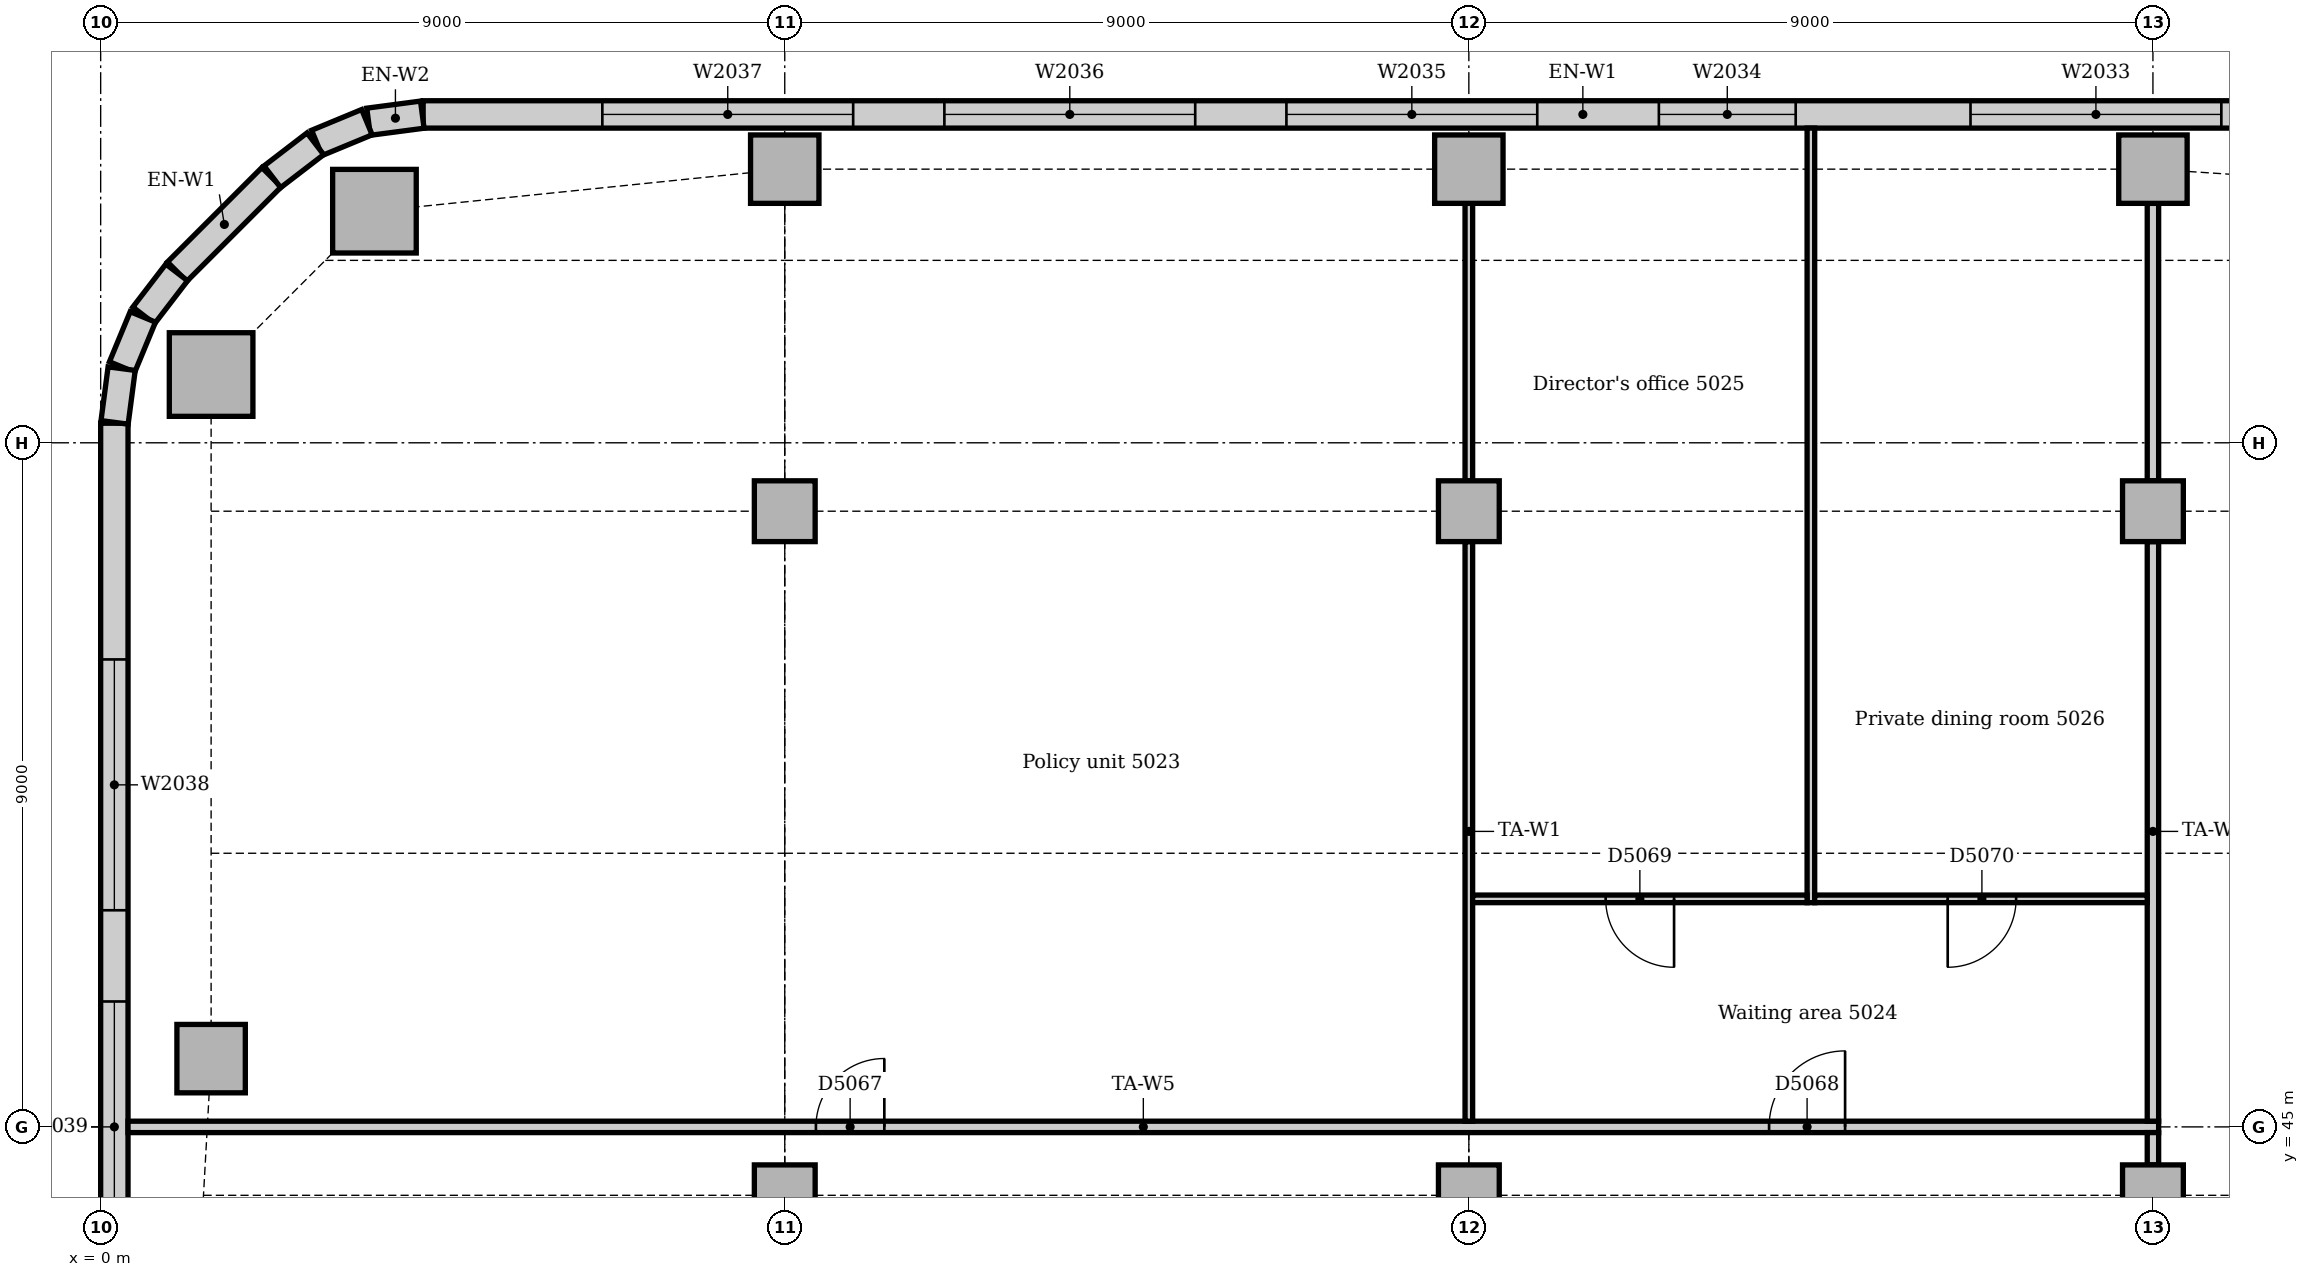
"""IFC4 building model, lengths in metres.
Left out: names, types, materials, properties, quantities, classifications, styles, units other than length and angle.
Written with IfcOpenShell. Run it as: python <this file> out.ifc"""

import sys

from ifc_helpers import new_model, si_unit, direction, frame, frame_2d, origin, origin_2d, place, context, subcontext, project, spatial, rectangle, extrude, element, fill, save


model = new_model("IFC4")
c1 = context("Model", 3, precision=1e-05, world=origin(), true_north=direction((0.0, 1.0)))
c2 = subcontext(c1, "Body", "Model", "MODEL_VIEW")
j1 = project(units=[si_unit("LENGTHUNIT", "METRE"), si_unit("PLANEANGLEUNIT", "RADIAN")], contexts=[c1])
p1 = place(None, origin())
s1 = spatial("IfcSite", under=j1, at=p1, CompositionType="ELEMENT")
p2 = place(p1, origin())
s2 = spatial("IfcBuilding", under=s1, at=p2, CompositionType="ELEMENT")
p3 = place(p2, frame((0.0, 0.0, 210.0)))
s3 = spatial("IfcBuildingStorey", under=s2, at=p3, CompositionType="ELEMENT", Elevation=210.0)
for number, where, z_axis, x_axis in (
    (1, (3.602, 57.047, 0.0), (0.0, 0.0, 1.0), (1.0, 0.0, 0.0)),
    (2, (1.453, 54.898, 0.0), (0.0, 0.0, 1.0), (1.0, 0.0, 0.0)),
):
    element("IfcColumn", number, at=place(p3, frame(where, z_axis=z_axis, x_axis=x_axis)), inside=s3, PredefinedType="COLUMN", context=c2, shape_type="SweptSolid", body=[
        extrude(rectangle(XDim=1.1, YDim=1.1, at=origin_2d()), origin(), (0.0, 0.0, 1.0), 3.85),
    ])
for number, where, z_axis, x_axis in (
    (3, (9.0, 57.6, 0.0), (0.0, 0.0, 1.0), (1.0, 0.0, 0.0)),
    (4, (18.0, 57.6, 0.0), (0.0, 0.0, 1.0), (1.0, 0.0, 0.0)),
    (5, (27.0, 57.6, 0.0), (0.0, 0.0, 1.0), (1.0, 0.0, 0.0)),
    (6, (1.453, 45.898, 0.0), (0.0, 0.0, 1.0), (1.0, 0.0, 0.0)),
):
    element("IfcColumn", number, at=place(p3, frame(where, z_axis=z_axis, x_axis=x_axis)), inside=s3, PredefinedType="COLUMN", context=c2, shape_type="SweptSolid", body=[
        extrude(rectangle(XDim=0.9, YDim=0.9, at=origin_2d()), origin(), (0.0, 0.0, 1.0), 3.85),
    ])
for number, where, z_axis, x_axis in (
    (7, (9.0, 44.1, 0.0), (0.0, 0.0, 1.0), (1.0, 0.0, 0.0)),
    (8, (9.0, 53.1, 0.0), (0.0, 0.0, 1.0), (1.0, 0.0, 0.0)),
    (9, (18.0, 44.1, 0.0), (0.0, 0.0, 1.0), (1.0, 0.0, 0.0)),
    (10, (18.0, 53.1, 0.0), (0.0, 0.0, 1.0), (1.0, 0.0, 0.0)),
    (11, (27.0, 44.1, 0.0), (0.0, 0.0, 1.0), (1.0, 0.0, 0.0)),
    (12, (27.0, 53.1, 0.0), (0.0, 0.0, 1.0), (1.0, 0.0, 0.0)),
):
    element("IfcColumn", number, at=place(p3, frame(where, z_axis=z_axis, x_axis=x_axis)), inside=s3, PredefinedType="COLUMN", context=c2, shape_type="SweptSolid", body=[
        extrude(rectangle(XDim=0.8, YDim=0.8, at=origin_2d()), origin(), (0.0, 0.0, 1.0), 3.85),
    ])
p4 = place(p3, frame((34.757, 58.32, 0.0), z_axis=(0.0, 0.0, 1.0), x_axis=(-1.0, 0.0, 0.0)))
e13 = element("IfcWall", 13, at=p4, inside=s3, PredefinedType="STANDARD", context=c2, shape_type="SweptSolid", body=[
    extrude(rectangle(XDim=30.515, YDim=0.36, at=frame_2d((15.257, 0.0))), origin(), (0.0, 0.0, 1.0), 3.85),
])
p5 = place(p4, frame((2.357, 0.0, 0.9)))
e14 = element("IfcOpeningElement", 14, at=p5, cuts=e13, PredefinedType="OPENING", context=c2, shape_type="SweptSolid", body=[
    extrude(rectangle(XDim=3.3, YDim=1.6, at=frame_2d((1.65, 0.8))), frame((0.0, 0.19, 0.0), z_axis=(0.0, -1.0, 0.0), x_axis=(1.0, 0.0, 0.0)), (0.0, 0.0, 1.0), 0.38),
])
p6 = place(p4, frame((6.857, 0.0, 0.9)))
e15 = element("IfcOpeningElement", 15, at=p6, cuts=e13, PredefinedType="OPENING", context=c2, shape_type="SweptSolid", body=[
    extrude(rectangle(XDim=3.3, YDim=1.6, at=frame_2d((1.65, 0.8))), frame((0.0, 0.19, 0.0), z_axis=(0.0, -1.0, 0.0), x_axis=(1.0, 0.0, 0.0)), (0.0, 0.0, 1.0), 0.38),
])
p7 = place(p4, frame((12.457, 0.0, 0.9)))
e16 = element("IfcOpeningElement", 16, at=p7, cuts=e13, PredefinedType="OPENING", context=c2, shape_type="SweptSolid", body=[
    extrude(rectangle(XDim=1.8, YDim=1.6, at=frame_2d((0.9, 0.8))), frame((0.0, 0.19, 0.0), z_axis=(0.0, -1.0, 0.0), x_axis=(1.0, 0.0, 0.0)), (0.0, 0.0, 1.0), 0.38),
])
p8 = place(p4, frame((15.857, 0.0, 0.9)))
e17 = element("IfcOpeningElement", 17, at=p8, cuts=e13, PredefinedType="OPENING", context=c2, shape_type="SweptSolid", body=[
    extrude(rectangle(XDim=3.3, YDim=1.6, at=frame_2d((1.65, 0.8))), frame((0.0, 0.19, 0.0), z_axis=(0.0, -1.0, 0.0), x_axis=(1.0, 0.0, 0.0)), (0.0, 0.0, 1.0), 0.38),
])
p9 = place(p4, frame((20.357, 0.0, 0.9)))
e18 = element("IfcOpeningElement", 18, at=p9, cuts=e13, PredefinedType="OPENING", context=c2, shape_type="SweptSolid", body=[
    extrude(rectangle(XDim=3.3, YDim=1.6, at=frame_2d((1.65, 0.8))), frame((0.0, 0.19, 0.0), z_axis=(0.0, -1.0, 0.0), x_axis=(1.0, 0.0, 0.0)), (0.0, 0.0, 1.0), 0.38),
])
p10 = place(p4, frame((24.857, 0.0, 0.9)))
e19 = element("IfcOpeningElement", 19, at=p10, cuts=e13, PredefinedType="OPENING", context=c2, shape_type="SweptSolid", body=[
    extrude(rectangle(XDim=3.3, YDim=1.6, at=frame_2d((1.65, 0.8))), frame((0.0, 0.19, 0.0), z_axis=(0.0, -1.0, 0.0), x_axis=(1.0, 0.0, 0.0)), (0.0, 0.0, 1.0), 0.38),
])
p11 = place(p3, frame((2.249, 57.494, 0.0), z_axis=(0.0, 0.0, 1.0), x_axis=(-0.707106781187, -0.707106781187, 0.0)))
e20 = element("IfcWall", 20, at=p11, inside=s3, PredefinedType="STANDARD", context=c2, shape_type="SweptSolid", body=[
    extrude(rectangle(XDim=1.757, YDim=0.36, at=frame_2d((0.879, 0.0))), origin(), (0.0, 0.0, 1.0), 3.85),
])
p12 = place(p3, frame((0.18, 54.257, 0.0), z_axis=(0.0, 0.0, 1.0), x_axis=(0.0, -1.0, 0.0)))
e21 = element("IfcWall", 21, at=p12, inside=s3, PredefinedType="STANDARD", context=c2, shape_type="SweptSolid", body=[
    extrude(rectangle(XDim=12.257, YDim=0.36, at=frame_2d((6.129, 0.0))), origin(), (0.0, 0.0, 1.0), 3.85),
])
p13 = place(p12, frame((3.107, 0.0, 0.9)))
e22 = element("IfcOpeningElement", 22, at=p13, cuts=e21, PredefinedType="OPENING", context=c2, shape_type="SweptSolid", body=[
    extrude(rectangle(XDim=3.3, YDim=1.6, at=frame_2d((1.65, 0.8))), frame((0.0, 0.19, 0.0), z_axis=(0.0, -1.0, 0.0), x_axis=(1.0, 0.0, 0.0)), (0.0, 0.0, 1.0), 0.38),
])
p14 = place(p12, frame((7.607, 0.0, 0.9)))
e23 = element("IfcOpeningElement", 23, at=p14, cuts=e21, PredefinedType="OPENING", context=c2, shape_type="SweptSolid", body=[
    extrude(rectangle(XDim=3.3, YDim=1.6, at=frame_2d((1.65, 0.8))), frame((0.0, 0.19, 0.0), z_axis=(0.0, -1.0, 0.0), x_axis=(1.0, 0.0, 0.0)), (0.0, 0.0, 1.0), 0.38),
])
for number, where, z_axis, x_axis in (
    (24, (4.231, 58.317, 0.0), (0.0, 0.0, 1.0), (-0.991, -0.131, 0.0)),
    (25, (3.503, 58.218, 0.0), (0.0, 0.0, 1.0), (-0.924, -0.383, 0.0)),
):
    element("IfcWall", number, at=place(p3, frame(where, z_axis=z_axis, x_axis=x_axis)), inside=s3, PredefinedType="STANDARD", context=c2, shape_type="SweptSolid", body=[
        extrude(rectangle(XDim=0.713, YDim=0.36, at=frame_2d((0.356, 0.0))), origin(), (0.0, 0.0, 1.0), 3.85),
    ])
for number, where, z_axis, x_axis in (
    (26, (2.825, 57.934, 0.0), (0.0, 0.0, 1.0), (-0.793, -0.609, 0.0)),
    (27, (1.0, 56.241, 0.0), (0.0, 0.0, 1.0), (-0.609, -0.793, 0.0)),
):
    element("IfcWall", number, at=place(p3, frame(where, z_axis=z_axis, x_axis=x_axis)), inside=s3, PredefinedType="STANDARD", context=c2, shape_type="SweptSolid", body=[
        extrude(rectangle(XDim=0.713, YDim=0.36, at=frame_2d((0.357, 0.0))), origin(), (0.0, 0.0, 1.0), 3.85),
    ])
for number, where, z_axis, x_axis in (
    (28, (0.555, 55.656, 0.0), (0.0, 0.0, 1.0), (-0.383, -0.924, 0.0)),
    (29, (0.276, 54.976, 0.0), (0.0, 0.0, 1.0), (-0.131, -0.991, 0.0)),
):
    element("IfcWall", number, at=place(p3, frame(where, z_axis=z_axis, x_axis=x_axis)), inside=s3, PredefinedType="STANDARD", context=c2, shape_type="SweptSolid", body=[
        extrude(rectangle(XDim=0.713, YDim=0.36, at=frame_2d((0.356, 0.0))), origin(), (0.0, 0.0, 1.0), 3.85),
    ])
p15 = place(p3, frame((0.36, 45.0, 0.0), z_axis=(0.0, 0.0, 1.0), x_axis=(1.0, 0.0, 0.0)))
e30 = element("IfcWall", 30, at=p15, inside=s3, PredefinedType="PARTITIONING", context=c2, shape_type="SweptSolid", body=[
    extrude(rectangle(XDim=26.715, YDim=0.15, at=frame_2d((13.357, 0.0))), origin(), (0.0, 0.0, 1.0), 3.85),
])
p16 = place(p15, frame((9.05, 0.0, 0.0)))
e31 = element("IfcOpeningElement", 31, at=p16, cuts=e30, PredefinedType="OPENING", context=c2, shape_type="SweptSolid", body=[
    extrude(rectangle(XDim=0.9, YDim=2.1, at=frame_2d((0.45, 1.05))), frame((0.0, 0.085, 0.0), z_axis=(0.0, -1.0, 0.0), x_axis=(1.0, 0.0, 0.0)), (0.0, 0.0, 1.0), 0.17),
])
p17 = place(p15, frame((21.59, 0.0, 0.0)))
e32 = element("IfcOpeningElement", 32, at=p17, cuts=e30, PredefinedType="OPENING", context=c2, shape_type="SweptSolid", body=[
    extrude(rectangle(XDim=1.0, YDim=2.1, at=frame_2d((0.5, 1.05))), frame((0.0, 0.085, 0.0), z_axis=(0.0, -1.0, 0.0), x_axis=(1.0, 0.0, 0.0)), (0.0, 0.0, 1.0), 0.17),
])
p18 = place(p3, frame((27.0, 44.5, 0.0), z_axis=(0.0, 0.0, 1.0), x_axis=(0.0, 1.0, 0.0)))
e33 = element("IfcWall", 33, at=p18, inside=s3, PredefinedType="PARTITIONING", context=c2, shape_type="SweptSolid", body=[
    extrude(rectangle(XDim=0.425, YDim=0.15, at=frame_2d((0.212, 0.0))), origin(), (0.0, 0.0, 1.0), 3.85),
])
p19 = place(p3, frame((27.0, 45.075, 0.0), z_axis=(0.0, 0.0, 1.0), x_axis=(0.0, 1.0, 0.0)))
e34 = element("IfcWall", 34, at=p19, inside=s3, PredefinedType="PARTITIONING", context=c2, shape_type="SweptSolid", body=[
    extrude(rectangle(XDim=7.625, YDim=0.15, at=frame_2d((3.812, 0.0))), origin(), (0.0, 0.0, 1.0), 3.35),
])
p20 = place(p3, frame((27.0, 53.5, 0.0), z_axis=(0.0, 0.0, 1.0), x_axis=(0.0, 1.0, 0.0)))
e35 = element("IfcWall", 35, at=p20, inside=s3, PredefinedType="PARTITIONING", context=c2, shape_type="SweptSolid", body=[
    extrude(rectangle(XDim=3.65, YDim=0.15, at=frame_2d((1.825, 0.0))), origin(), (0.0, 0.0, 1.0), 3.41),
])
p21 = place(p3, frame((18.0, 45.075, 0.0), z_axis=(0.0, 0.0, 1.0), x_axis=(0.0, 1.0, 0.0)))
e36 = element("IfcWall", 36, at=p21, inside=s3, PredefinedType="PARTITIONING", context=c2, shape_type="SweptSolid", body=[
    extrude(rectangle(XDim=7.625, YDim=0.1, at=frame_2d((3.812, 0.0))), origin(), (0.0, 0.0, 1.0), 3.35),
])
p22 = place(p3, frame((18.0, 53.5, 0.0), z_axis=(0.0, 0.0, 1.0), x_axis=(0.0, 1.0, 0.0)))
e37 = element("IfcWall", 37, at=p22, inside=s3, PredefinedType="PARTITIONING", context=c2, shape_type="SweptSolid", body=[
    extrude(rectangle(XDim=3.65, YDim=0.1, at=frame_2d((1.825, 0.0))), origin(), (0.0, 0.0, 1.0), 3.41),
])
p23 = place(p3, frame((22.5, 47.95, 0.0), z_axis=(0.0, 0.0, 1.0), x_axis=(0.0, 1.0, 0.0)))
e38 = element("IfcWall", 38, at=p23, inside=s3, PredefinedType="PARTITIONING", context=c2, shape_type="SweptSolid", body=[
    extrude(rectangle(XDim=10.19, YDim=0.1, at=frame_2d((5.095, 0.0))), origin(), (0.0, 0.0, 1.0), 3.85),
])
p24 = place(p3, frame((18.05, 48.0, 0.0), z_axis=(0.0, 0.0, 1.0), x_axis=(1.0, 0.0, 0.0)))
e39 = element("IfcWall", 39, at=p24, inside=s3, PredefinedType="PARTITIONING", context=c2, shape_type="SweptSolid", body=[
    extrude(rectangle(XDim=4.4, YDim=0.1, at=frame_2d((2.2, 0.0))), origin(), (0.0, 0.0, 1.0), 3.85),
])
p25 = place(p24, frame((1.75, 0.0, 0.0)))
e40 = element("IfcOpeningElement", 40, at=p25, cuts=e39, PredefinedType="OPENING", context=c2, shape_type="SweptSolid", body=[
    extrude(rectangle(XDim=0.9, YDim=2.1, at=frame_2d((0.45, 1.05))), frame((0.0, 0.06, 0.0), z_axis=(0.0, -1.0, 0.0), x_axis=(1.0, 0.0, 0.0)), (0.0, 0.0, 1.0), 0.12),
])
p26 = place(p3, frame((22.55, 48.0, 0.0), z_axis=(0.0, 0.0, 1.0), x_axis=(1.0, 0.0, 0.0)))
e41 = element("IfcWall", 41, at=p26, inside=s3, PredefinedType="PARTITIONING", context=c2, shape_type="SweptSolid", body=[
    extrude(rectangle(XDim=4.375, YDim=0.1, at=frame_2d((2.188, 0.0))), origin(), (0.0, 0.0, 1.0), 3.85),
])
p27 = place(p26, frame((1.75, 0.0, 0.0)))
e42 = element("IfcOpeningElement", 42, at=p27, cuts=e41, PredefinedType="OPENING", context=c2, shape_type="SweptSolid", body=[
    extrude(rectangle(XDim=0.9, YDim=2.1, at=frame_2d((0.45, 1.05))), frame((0.0, 0.06, 0.0), z_axis=(0.0, -1.0, 0.0), x_axis=(1.0, 0.0, 0.0)), (0.0, 0.0, 1.0), 0.12),
])
p28 = place(p6, origin())
e43 = element("IfcWindow", 43, at=p28, inside=s3, PartitioningType="SINGLE_PANEL", PredefinedType="WINDOW", context=c2, shape_type="SweptSolid", body=[
    extrude(rectangle(XDim=3.3, YDim=1.6, at=frame_2d((1.65, 0.8))), frame((0.0, 0.13, 0.0), z_axis=(0.0, -1.0, 0.0), x_axis=(1.0, 0.0, 0.0)), (0.0, 0.0, 1.0), 0.06),
])
fill(e15, e43)
p29 = place(p7, origin())
e44 = element("IfcWindow", 44, at=p29, inside=s3, PartitioningType="SINGLE_PANEL", PredefinedType="WINDOW", context=c2, shape_type="SweptSolid", body=[
    extrude(rectangle(XDim=1.8, YDim=1.6, at=frame_2d((0.9, 0.8))), frame((0.0, 0.13, 0.0), z_axis=(0.0, -1.0, 0.0), x_axis=(1.0, 0.0, 0.0)), (0.0, 0.0, 1.0), 0.06),
])
fill(e16, e44)
p30 = place(p8, origin())
e45 = element("IfcWindow", 45, at=p30, inside=s3, PartitioningType="SINGLE_PANEL", PredefinedType="WINDOW", context=c2, shape_type="SweptSolid", body=[
    extrude(rectangle(XDim=3.3, YDim=1.6, at=frame_2d((1.65, 0.8))), frame((0.0, 0.13, 0.0), z_axis=(0.0, -1.0, 0.0), x_axis=(1.0, 0.0, 0.0)), (0.0, 0.0, 1.0), 0.06),
])
fill(e17, e45)
p31 = place(p9, origin())
e46 = element("IfcWindow", 46, at=p31, inside=s3, PartitioningType="SINGLE_PANEL", PredefinedType="WINDOW", context=c2, shape_type="SweptSolid", body=[
    extrude(rectangle(XDim=3.3, YDim=1.6, at=frame_2d((1.65, 0.8))), frame((0.0, 0.13, 0.0), z_axis=(0.0, -1.0, 0.0), x_axis=(1.0, 0.0, 0.0)), (0.0, 0.0, 1.0), 0.06),
])
fill(e18, e46)
p32 = place(p10, origin())
e47 = element("IfcWindow", 47, at=p32, inside=s3, PartitioningType="SINGLE_PANEL", PredefinedType="WINDOW", context=c2, shape_type="SweptSolid", body=[
    extrude(rectangle(XDim=3.3, YDim=1.6, at=frame_2d((1.65, 0.8))), frame((0.0, 0.13, 0.0), z_axis=(0.0, -1.0, 0.0), x_axis=(1.0, 0.0, 0.0)), (0.0, 0.0, 1.0), 0.06),
])
fill(e19, e47)
p33 = place(p13, origin())
e48 = element("IfcWindow", 48, at=p33, inside=s3, PartitioningType="SINGLE_PANEL", PredefinedType="WINDOW", context=c2, shape_type="SweptSolid", body=[
    extrude(rectangle(XDim=3.3, YDim=1.6, at=frame_2d((1.65, 0.8))), frame((0.0, 0.13, 0.0), z_axis=(0.0, -1.0, 0.0), x_axis=(1.0, 0.0, 0.0)), (0.0, 0.0, 1.0), 0.06),
])
fill(e22, e48)
p34 = place(p14, origin())
e49 = element("IfcWindow", 49, at=p34, inside=s3, PartitioningType="SINGLE_PANEL", PredefinedType="WINDOW", context=c2, shape_type="SweptSolid", body=[
    extrude(rectangle(XDim=3.3, YDim=1.6, at=frame_2d((1.65, 0.8))), frame((0.0, 0.13, 0.0), z_axis=(0.0, -1.0, 0.0), x_axis=(1.0, 0.0, 0.0)), (0.0, 0.0, 1.0), 0.06),
])
fill(e23, e49)
p35 = place(p16, origin())
e50 = element("IfcDoor", 50, at=p35, inside=s3, OperationType="SINGLE_SWING_RIGHT", PredefinedType="DOOR", context=c2, shape_type="SweptSolid", body=[
    extrude(rectangle(XDim=0.9, YDim=2.1, at=frame_2d((0.45, 1.05))), frame((0.0, 0.025, 0.0), z_axis=(0.0, -1.0, 0.0), x_axis=(1.0, 0.0, 0.0)), (0.0, 0.0, 1.0), 0.05),
])
fill(e31, e50)
p36 = place(p17, origin())
e51 = element("IfcDoor", 51, at=p36, inside=s3, OperationType="SINGLE_SWING_RIGHT", PredefinedType="DOOR", context=c2, shape_type="SweptSolid", body=[
    extrude(rectangle(XDim=1.0, YDim=2.1, at=frame_2d((0.5, 1.05))), frame((0.0, 0.025, 0.0), z_axis=(0.0, -1.0, 0.0), x_axis=(1.0, 0.0, 0.0)), (0.0, 0.0, 1.0), 0.05),
])
fill(e32, e51)
p37 = place(p25, frame((0.9, 0.0, 0.0), z_axis=(0.0, 0.0, 1.0), x_axis=(-1.0, 0.0, 0.0)))
e52 = element("IfcDoor", 52, at=p37, inside=s3, OperationType="SINGLE_SWING_LEFT", PredefinedType="DOOR", context=c2, shape_type="SweptSolid", body=[
    extrude(rectangle(XDim=0.9, YDim=2.1, at=frame_2d((0.45, 1.05))), frame((0.0, 0.025, 0.0), z_axis=(0.0, -1.0, 0.0), x_axis=(1.0, 0.0, 0.0)), (0.0, 0.0, 1.0), 0.05),
])
fill(e40, e52)
p38 = place(p27, frame((0.9, 0.0, 0.0), z_axis=(0.0, 0.0, 1.0), x_axis=(-1.0, 0.0, 0.0)))
e53 = element("IfcDoor", 53, at=p38, inside=s3, OperationType="SINGLE_SWING_RIGHT", PredefinedType="DOOR", context=c2, shape_type="SweptSolid", body=[
    extrude(rectangle(XDim=0.9, YDim=2.1, at=frame_2d((0.45, 1.05))), frame((0.0, 0.025, 0.0), z_axis=(0.0, -1.0, 0.0), x_axis=(1.0, 0.0, 0.0)), (0.0, 0.0, 1.0), 0.05),
])
fill(e42, e53)
save(model, sys.argv[1])
